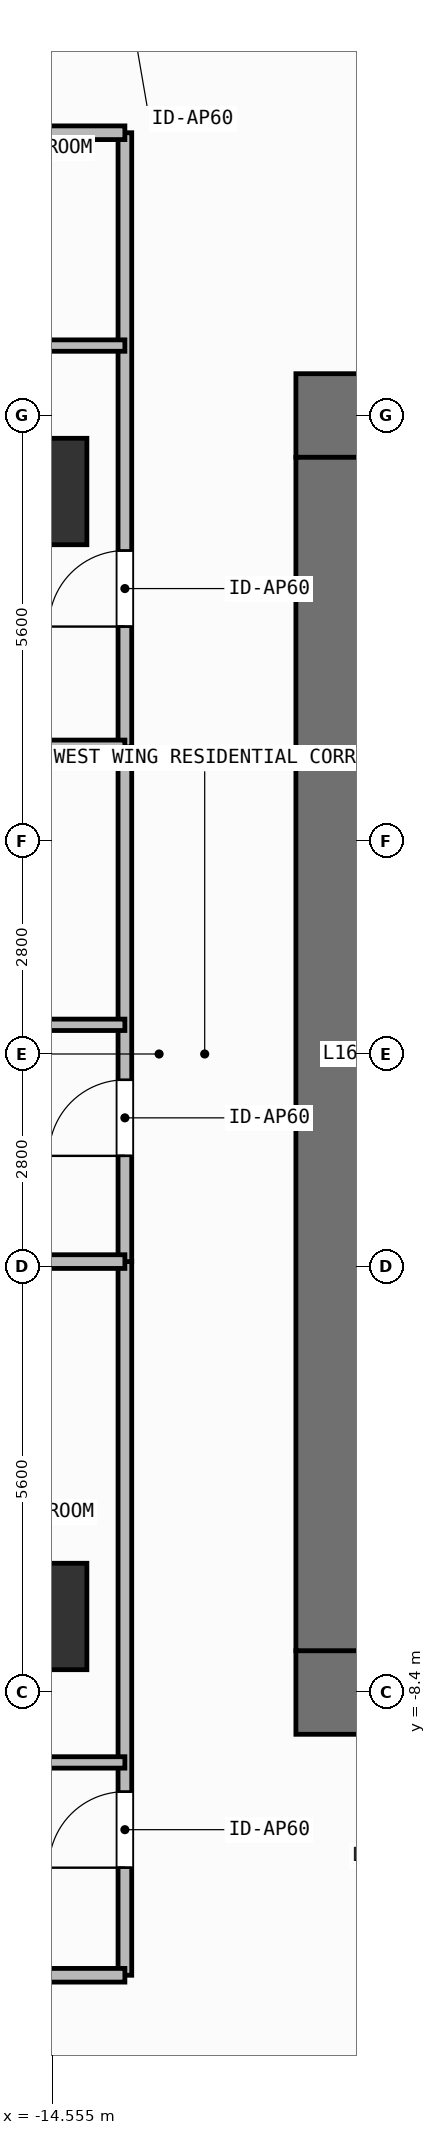
"""IFC4 building model, lengths in metres.
Left out: names, types, materials, properties, quantities, classifications, styles, units other than length and angle.
Written with IfcOpenShell. Run it as: python <this file> out.ifc"""

import sys

from ifc_helpers import new_model, si_unit, direction, frame, frame_2d, origin, origin_2d, place, context, subcontext, project, spatial, rectangle, extrude, element, fill, save


model = new_model("IFC4")
c1 = context("Model", 3, precision=1e-05, world=origin(), true_north=direction((0.0, 1.0)))
c2 = subcontext(c1, "Body", "Model", "MODEL_VIEW")
j1 = project(units=[si_unit("LENGTHUNIT", "METRE"), si_unit("PLANEANGLEUNIT", "RADIAN")], contexts=[c1])
p1 = place(None, origin())
s1 = spatial("IfcSite", under=j1, at=p1, CompositionType="ELEMENT")
p2 = place(p1, origin())
s2 = spatial("IfcBuilding", under=s1, at=p2, CompositionType="ELEMENT")
p3 = place(p2, frame((0.0, 0.0, 61.8)))
s3 = spatial("IfcBuildingStorey", under=s2, at=p3, CompositionType="ELEMENT", Elevation=61.8)
for number, where, z_axis, x_axis in (
    (1, (-11.35, -8.4, 0.0), (0.0, 0.0, 1.0), (1.0, 0.0, 0.0)),
    (2, (-11.35, 8.4, 0.0), (0.0, 0.0, 1.0), (1.0, 0.0, 0.0)),
):
    element("IfcWall", number, at=place(p3, frame(where, z_axis=z_axis, x_axis=x_axis)), inside=s3, PredefinedType="SHEAR", context=c2, shape_type="SweptSolid", body=[
        extrude(rectangle(XDim=1.65, YDim=1.1, at=frame_2d((0.825, 0.0))), origin(), (0.0, 0.0, 1.0), 3.9),
    ])
p4 = place(p3, frame((-10.8, -7.85, 0.0), z_axis=(0.0, 0.0, 1.0), x_axis=(0.0, 1.0, 0.0)))
e3 = element("IfcWall", 3, at=p4, inside=s3, PredefinedType="SHEAR", context=c2, shape_type="SweptSolid", body=[
    extrude(rectangle(XDim=15.7, YDim=1.1, at=frame_2d((7.85, 0.0))), origin(), (0.0, 0.0, 1.0), 3.9),
])
for number, where, z_axis, x_axis in (
    (4, (-14.8, -7.4, 0.0), (0.0, 0.0, 1.0), (1.0, 0.0, 0.0)),
    (5, (-14.8, 7.4, 0.0), (0.0, 0.0, 1.0), (1.0, 0.0, 0.0)),
):
    element("IfcColumn", number, at=place(p3, frame(where, z_axis=z_axis, x_axis=x_axis)), inside=s3, PredefinedType="COLUMN", context=c2, shape_type="SweptSolid", body=[
        extrude(rectangle(XDim=1.4, YDim=1.4, at=origin_2d()), origin(), (0.0, 0.0, 1.0), 3.9),
    ])
p5 = place(p3, frame((-13.6, -12.12, 0.0), z_axis=(0.0, 0.0, 1.0), x_axis=(0.0, 1.0, 0.0)))
e6 = element("IfcWall", 6, at=p5, inside=s3, PredefinedType="PARTITIONING", context=c2, shape_type="SweptSolid", body=[
    extrude(rectangle(XDim=9.389, YDim=0.18, at=frame_2d((4.695, 0.0))), origin(), (0.0, 0.0, 1.0), 3.68),
])
p6 = place(p5, frame((1.415, 0.0, 0.0)))
e7 = element("IfcOpeningElement", 7, at=p6, cuts=e6, PredefinedType="OPENING", context=c2, shape_type="SweptSolid", body=[
    extrude(rectangle(XDim=1.0, YDim=2.2, at=frame_2d((0.5, 1.1))), frame((0.0, 0.1, 0.0), z_axis=(0.0, -1.0, 0.0), x_axis=(1.0, 0.0, 0.0)), (0.0, 0.0, 1.0), 0.2),
])
p7 = place(p3, frame((-16.863, -9.32, 0.0), z_axis=(0.0, 0.0, 1.0), x_axis=(1.0, 0.0, 0.0)))
e8 = element("IfcWall", 8, at=p7, inside=s3, PredefinedType="PARTITIONING", context=c2, shape_type="SweptSolid", body=[
    extrude(rectangle(XDim=3.263, YDim=0.15, at=frame_2d((1.631, 0.0))), origin(), (0.0, 0.0, 1.0), 3.68),
])
p8 = place(p7, frame((0.334, 0.0, 0.0)))
e9 = element("IfcOpeningElement", 9, at=p8, cuts=e8, PredefinedType="OPENING", context=c2, shape_type="SweptSolid", body=[
    extrude(rectangle(XDim=0.85, YDim=2.1, at=frame_2d((0.425, 1.05))), frame((0.0, 0.085, 0.0), z_axis=(0.0, -1.0, 0.0), x_axis=(1.0, 0.0, 0.0)), (0.0, 0.0, 1.0), 0.17),
])
p9 = place(p3, frame((-13.6, -2.731, 0.0), z_axis=(0.0, 0.0, 1.0), x_axis=(0.0, 1.0, 0.0)))
e10 = element("IfcWall", 10, at=p9, inside=s3, PredefinedType="PARTITIONING", context=c2, shape_type="SweptSolid", body=[
    extrude(rectangle(XDim=6.771, YDim=0.18, at=frame_2d((3.385, 0.0))), origin(), (0.0, 0.0, 1.0), 3.68),
])
p10 = place(p9, frame((1.391, 0.0, 0.0)))
e11 = element("IfcOpeningElement", 11, at=p10, cuts=e10, PredefinedType="OPENING", context=c2, shape_type="SweptSolid", body=[
    extrude(rectangle(XDim=1.0, YDim=2.2, at=frame_2d((0.5, 1.1))), frame((0.0, 0.1, 0.0), z_axis=(0.0, -1.0, 0.0), x_axis=(1.0, 0.0, 0.0)), (0.0, 0.0, 1.0), 0.2),
])
p11 = place(p3, frame((-16.902, 0.384, 0.0), z_axis=(0.0, 0.0, 1.0), x_axis=(1.0, 0.0, 0.0)))
e12 = element("IfcWall", 12, at=p11, inside=s3, PredefinedType="PARTITIONING", context=c2, shape_type="SweptSolid", body=[
    extrude(rectangle(XDim=3.302, YDim=0.15, at=frame_2d((1.651, 0.0))), origin(), (0.0, 0.0, 1.0), 3.68),
])
p12 = place(p11, frame((1.226, 0.0, 0.0)))
e13 = element("IfcOpeningElement", 13, at=p12, cuts=e12, PredefinedType="OPENING", context=c2, shape_type="SweptSolid", body=[
    extrude(rectangle(XDim=0.85, YDim=2.1, at=frame_2d((0.425, 1.05))), frame((0.0, 0.085, 0.0), z_axis=(0.0, -1.0, 0.0), x_axis=(1.0, 0.0, 0.0)), (0.0, 0.0, 1.0), 0.17),
])
p13 = place(p3, frame((-13.6, 4.04, 0.0), z_axis=(0.0, 0.0, 1.0), x_axis=(0.0, 1.0, 0.0)))
e14 = element("IfcWall", 14, at=p13, inside=s3, PredefinedType="PARTITIONING", context=c2, shape_type="SweptSolid", body=[
    extrude(rectangle(XDim=8.08, YDim=0.18, at=frame_2d((4.04, 0.0))), origin(), (0.0, 0.0, 1.0), 3.68),
])
p14 = place(p13, frame((1.583, 0.0, 0.0)))
e15 = element("IfcOpeningElement", 15, at=p14, cuts=e14, PredefinedType="OPENING", context=c2, shape_type="SweptSolid", body=[
    extrude(rectangle(XDim=1.0, YDim=2.2, at=frame_2d((0.5, 1.1))), frame((0.0, 0.1, 0.0), z_axis=(0.0, -1.0, 0.0), x_axis=(1.0, 0.0, 0.0)), (0.0, 0.0, 1.0), 0.2),
])
p15 = place(p3, frame((-16.902, 9.32, 0.0), z_axis=(0.0, 0.0, 1.0), x_axis=(1.0, 0.0, 0.0)))
e16 = element("IfcWall", 16, at=p15, inside=s3, PredefinedType="PARTITIONING", context=c2, shape_type="SweptSolid", body=[
    extrude(rectangle(XDim=3.302, YDim=0.15, at=frame_2d((1.651, 0.0))), origin(), (0.0, 0.0, 1.0), 3.68),
])
p16 = place(p15, frame((0.338, 0.0, 0.0)))
e17 = element("IfcOpeningElement", 17, at=p16, cuts=e16, PredefinedType="OPENING", context=c2, shape_type="SweptSolid", body=[
    extrude(rectangle(XDim=0.85, YDim=2.1, at=frame_2d((0.425, 1.05))), frame((0.0, 0.085, 0.0), z_axis=(0.0, -1.0, 0.0), x_axis=(1.0, 0.0, 0.0)), (0.0, 0.0, 1.0), 0.17),
])
for number, where, z_axis, x_axis in (
    (18, (-27.93, -2.731, 0.0), (0.0, 0.0, 1.0), (1.0, 0.0, 0.0)),
    (19, (-27.93, 4.04, 0.0), (0.0, 0.0, 1.0), (1.0, 0.0, 0.0)),
    (20, (-27.93, -12.12, 0.0), (0.0, 0.0, 1.0), (1.0, 0.0, 0.0)),
    (21, (-27.93, 12.12, 0.0), (0.0, 0.0, 1.0), (1.0, 0.0, 0.0)),
):
    element("IfcWall", number, at=place(p3, frame(where, z_axis=z_axis, x_axis=x_axis)), inside=s3, PredefinedType="PARTITIONING", context=c2, shape_type="SweptSolid", body=[
        extrude(rectangle(XDim=14.33, YDim=0.18, at=frame_2d((7.165, 0.0))), origin(), (0.0, 0.0, 1.0), 3.68),
    ])
p17 = place(p6, origin())
e22 = element("IfcDoor", 22, at=p17, inside=s3, OperationType="SINGLE_SWING_LEFT", PredefinedType="DOOR", context=c2, shape_type="SweptSolid", body=[
    extrude(rectangle(XDim=1.0, YDim=2.2, at=frame_2d((0.5, 1.1))), frame((0.0, 0.025, 0.0), z_axis=(0.0, -1.0, 0.0), x_axis=(1.0, 0.0, 0.0)), (0.0, 0.0, 1.0), 0.05),
])
fill(e7, e22)
p18 = place(p10, origin())
e23 = element("IfcDoor", 23, at=p18, inside=s3, OperationType="SINGLE_SWING_LEFT", PredefinedType="DOOR", context=c2, shape_type="SweptSolid", body=[
    extrude(rectangle(XDim=1.0, YDim=2.2, at=frame_2d((0.5, 1.1))), frame((0.0, 0.025, 0.0), z_axis=(0.0, -1.0, 0.0), x_axis=(1.0, 0.0, 0.0)), (0.0, 0.0, 1.0), 0.05),
])
fill(e11, e23)
p19 = place(p14, origin())
e24 = element("IfcDoor", 24, at=p19, inside=s3, OperationType="SINGLE_SWING_LEFT", PredefinedType="DOOR", context=c2, shape_type="SweptSolid", body=[
    extrude(rectangle(XDim=1.0, YDim=2.2, at=frame_2d((0.5, 1.1))), frame((0.0, 0.025, 0.0), z_axis=(0.0, -1.0, 0.0), x_axis=(1.0, 0.0, 0.0)), (0.0, 0.0, 1.0), 0.05),
])
fill(e15, e24)
save(model, sys.argv[1])
